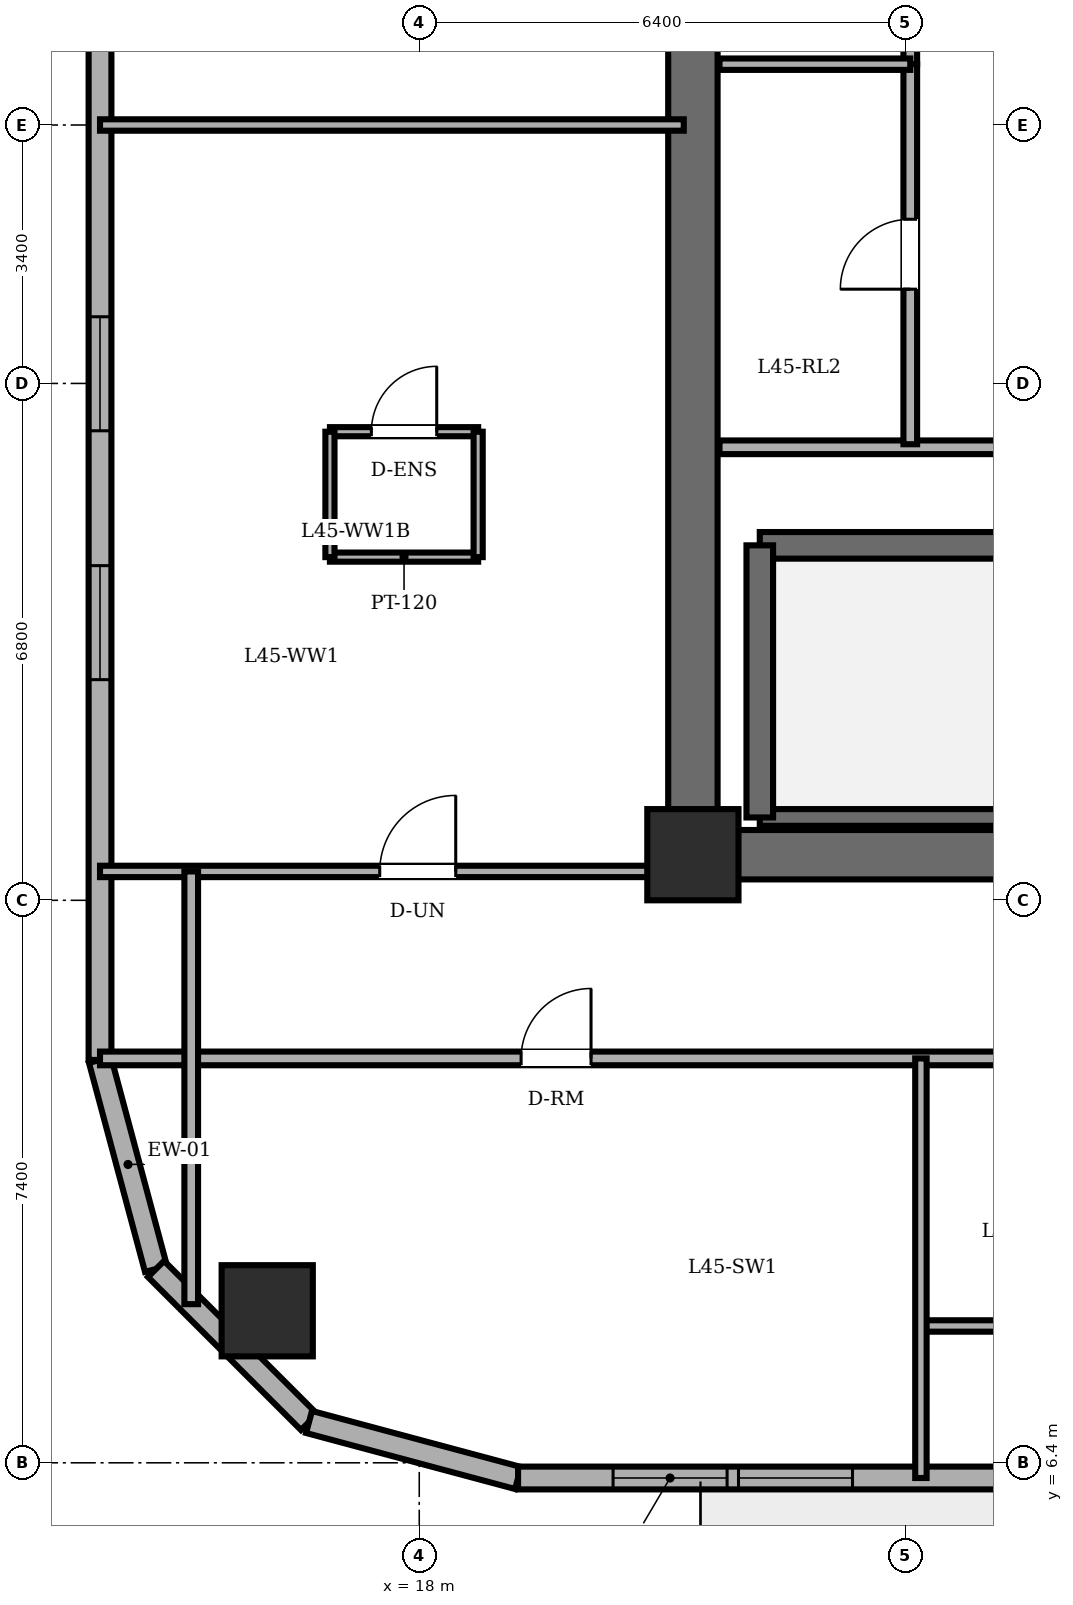
"""IFC4 building model, lengths in metres.
Left out: names, types, materials, properties, quantities, classifications, styles, units other than length and angle.
Written with IfcOpenShell. Run it as: python <this file> out.ifc"""

import sys

from ifc_helpers import new_model, si_unit, direction, frame, frame_2d, origin, origin_2d, place, context, subcontext, project, spatial, rectangle, circle, extrude, element, fill, save


model = new_model("IFC4")
c1 = context("Model", 3, precision=1e-05, world=origin(), true_north=direction((0.0, 1.0)))
c2 = subcontext(c1, "Body", "Model", "MODEL_VIEW")
j1 = project(units=[si_unit("LENGTHUNIT", "METRE"), si_unit("PLANEANGLEUNIT", "RADIAN")], contexts=[c1])
p1 = place(None, origin())
s1 = spatial("IfcSite", under=j1, at=p1, CompositionType="ELEMENT")
p2 = place(p1, origin())
s2 = spatial("IfcBuilding", under=s1, at=p2, CompositionType="ELEMENT")
p3 = place(p2, frame((0.0, 0.0, 172.6)))
s3 = spatial("IfcBuildingStorey", under=s2, at=p3, CompositionType="ELEMENT", Elevation=172.6)
p4 = place(p3, frame((21.6, 14.4, 0.0), z_axis=(0.0, 0.0, 1.0), x_axis=(1.0, 0.0, 0.0)))
e1 = element("IfcColumn", 1, at=p4, inside=s3, PredefinedType="COLUMN", context=c2, shape_type="SweptSolid", body=[
    extrude(rectangle(XDim=1.2, YDim=1.2, at=origin_2d()), origin(), (0.0, 0.0, 1.0), 3.6),
])
p5 = place(p3, frame((16.0, 8.4, 0.0), z_axis=(0.0, 0.0, 1.0), x_axis=(1.0, 0.0, 0.0)))
e2 = element("IfcColumn", 2, at=p5, inside=s3, PredefinedType="COLUMN", context=c2, shape_type="SweptSolid", body=[
    extrude(circle(Radius=0.6, at=origin_2d()), origin(), (0.0, 0.0, 1.0), 3.6),
])
p6 = place(p3, frame((13.8, 11.7, 0.0), z_axis=(0.0, 0.0, 1.0), x_axis=(0.258884674387, -0.965908238586, 0.0)))
e3 = element("IfcWall", 3, at=p6, inside=s3, PredefinedType="SOLIDWALL", context=c2, shape_type="SweptSolid", body=[
    extrude(rectangle(XDim=2.847, YDim=0.3, at=frame_2d((1.424, 0.0))), origin(), (0.0, 0.0, 1.0), 3.4),
])
p7 = place(p3, frame((14.537, 8.95, 0.0), z_axis=(0.0, 0.0, 1.0), x_axis=(0.707106781187, -0.707106781187, 0.0)))
e4 = element("IfcWall", 4, at=p7, inside=s3, PredefinedType="SOLIDWALL", context=c2, shape_type="SweptSolid", body=[
    extrude(rectangle(XDim=2.847, YDim=0.3, at=frame_2d((1.423, 0.0))), origin(), (0.0, 0.0, 1.0), 3.4),
])
p8 = place(p3, frame((16.55, 6.937, 0.0), z_axis=(0.0, 0.0, 1.0), x_axis=(0.965908238586, -0.258884674387, 0.0)))
e5 = element("IfcWall", 5, at=p8, inside=s3, PredefinedType="SOLIDWALL", context=c2, shape_type="SweptSolid", body=[
    extrude(rectangle(XDim=2.847, YDim=0.3, at=frame_2d((1.424, 0.0))), origin(), (0.0, 0.0, 1.0), 3.4),
])
p9 = place(p3, frame((19.3, 6.2, 0.0), z_axis=(0.0, 0.0, 1.0), x_axis=(1.0, 0.0, 0.0)))
e6 = element("IfcWall", 6, at=p9, inside=s3, PredefinedType="SOLIDWALL", context=c2, shape_type="SweptSolid", body=[
    extrude(rectangle(XDim=30.282, YDim=0.3, at=frame_2d((15.141, 0.0))), origin(), (0.0, 0.0, 1.0), 3.4),
])
p10 = place(p9, frame((10.075, 0.0, 0.0)))
e7 = element("IfcOpeningElement", 7, at=p10, cuts=e6, PredefinedType="OPENING", context=c2, shape_type="SweptSolid", body=[
    extrude(rectangle(XDim=0.95, YDim=2.2, at=frame_2d((0.475, 1.1))), frame((0.0, 0.16, 0.0), z_axis=(0.0, -1.0, 0.0), x_axis=(1.0, 0.0, 0.0)), (0.0, 0.0, 1.0), 0.32),
])
p11 = place(p9, frame((1.25, 0.0, 0.85)))
e8 = element("IfcOpeningElement", 8, at=p11, cuts=e6, PredefinedType="OPENING", context=c2, shape_type="SweptSolid", body=[
    extrude(rectangle(XDim=1.5, YDim=1.55, at=frame_2d((0.75, 0.775))), frame((0.0, 0.16, 0.0), z_axis=(0.0, -1.0, 0.0), x_axis=(1.0, 0.0, 0.0)), (0.0, 0.0, 1.0), 0.32),
])
p12 = place(p9, frame((2.9, 0.0, 0.85)))
e9 = element("IfcOpeningElement", 9, at=p12, cuts=e6, PredefinedType="OPENING", context=c2, shape_type="SweptSolid", body=[
    extrude(rectangle(XDim=1.5, YDim=1.55, at=frame_2d((0.75, 0.775))), frame((0.0, 0.16, 0.0), z_axis=(0.0, -1.0, 0.0), x_axis=(1.0, 0.0, 0.0)), (0.0, 0.0, 1.0), 0.32),
])
p13 = place(p9, frame((6.45, 0.0, 0.85)))
e10 = element("IfcOpeningElement", 10, at=p13, cuts=e6, PredefinedType="OPENING", context=c2, shape_type="SweptSolid", body=[
    extrude(rectangle(XDim=1.5, YDim=1.55, at=frame_2d((0.75, 0.775))), frame((0.0, 0.16, 0.0), z_axis=(0.0, -1.0, 0.0), x_axis=(1.0, 0.0, 0.0)), (0.0, 0.0, 1.0), 0.32),
])
p14 = place(p9, frame((15.294, 0.0, 0.85)))
e11 = element("IfcOpeningElement", 11, at=p14, cuts=e6, PredefinedType="OPENING", context=c2, shape_type="SweptSolid", body=[
    extrude(rectangle(XDim=1.5, YDim=1.55, at=frame_2d((0.75, 0.775))), frame((0.0, 0.16, 0.0), z_axis=(0.0, -1.0, 0.0), x_axis=(1.0, 0.0, 0.0)), (0.0, 0.0, 1.0), 0.32),
])
p15 = place(p9, frame((22.238, 0.0, 0.85)))
e12 = element("IfcOpeningElement", 12, at=p15, cuts=e6, PredefinedType="OPENING", context=c2, shape_type="SweptSolid", body=[
    extrude(rectangle(XDim=1.5, YDim=1.55, at=frame_2d((0.75, 0.775))), frame((0.0, 0.16, 0.0), z_axis=(0.0, -1.0, 0.0), x_axis=(1.0, 0.0, 0.0)), (0.0, 0.0, 1.0), 0.32),
])
p16 = place(p3, frame((13.8, 36.3, 0.0), z_axis=(0.0, 0.0, 1.0), x_axis=(0.0, -1.0, 0.0)))
e13 = element("IfcWall", 13, at=p16, inside=s3, PredefinedType="SOLIDWALL", context=c2, shape_type="SweptSolid", body=[
    extrude(rectangle(XDim=24.6, YDim=0.3, at=frame_2d((12.3, 0.0))), origin(), (0.0, 0.0, 1.0), 3.4),
])
p17 = place(p16, frame((5.003, 0.0, 0.85)))
e14 = element("IfcOpeningElement", 14, at=p17, cuts=e13, PredefinedType="OPENING", context=c2, shape_type="SweptSolid", body=[
    extrude(rectangle(XDim=1.5, YDim=1.55, at=frame_2d((0.75, 0.775))), frame((0.0, 0.16, 0.0), z_axis=(0.0, -1.0, 0.0), x_axis=(1.0, 0.0, 0.0)), (0.0, 0.0, 1.0), 0.32),
])
p18 = place(p16, frame((8.277, 0.0, 0.85)))
e15 = element("IfcOpeningElement", 15, at=p18, cuts=e13, PredefinedType="OPENING", context=c2, shape_type="SweptSolid", body=[
    extrude(rectangle(XDim=1.5, YDim=1.55, at=frame_2d((0.75, 0.775))), frame((0.0, 0.16, 0.0), z_axis=(0.0, -1.0, 0.0), x_axis=(1.0, 0.0, 0.0)), (0.0, 0.0, 1.0), 0.32),
])
p19 = place(p16, frame((14.823, 0.0, 0.85)))
e16 = element("IfcOpeningElement", 16, at=p19, cuts=e13, PredefinedType="OPENING", context=c2, shape_type="SweptSolid", body=[
    extrude(rectangle(XDim=1.5, YDim=1.55, at=frame_2d((0.75, 0.775))), frame((0.0, 0.16, 0.0), z_axis=(0.0, -1.0, 0.0), x_axis=(1.0, 0.0, 0.0)), (0.0, 0.0, 1.0), 0.32),
])
p20 = place(p16, frame((18.097, 0.0, 0.85)))
e17 = element("IfcOpeningElement", 17, at=p20, cuts=e13, PredefinedType="OPENING", context=c2, shape_type="SweptSolid", body=[
    extrude(rectangle(XDim=1.5, YDim=1.55, at=frame_2d((0.75, 0.775))), frame((0.0, 0.16, 0.0), z_axis=(0.0, -1.0, 0.0), x_axis=(1.0, 0.0, 0.0)), (0.0, 0.0, 1.0), 0.32),
])
p21 = place(p3, frame((21.6, 14.4, 0.0), z_axis=(0.0, 0.0, 1.0), x_axis=(0.0, 1.0, 0.0)))
e18 = element("IfcWall", 18, at=p21, inside=s3, PredefinedType="SHEAR", context=c2, shape_type="SweptSolid", body=[
    extrude(rectangle(XDim=19.2, YDim=0.65, at=frame_2d((9.6, 0.0))), origin(), (0.0, 0.0, 1.0), 3.4),
])
p22 = place(p3, frame((37.2, 14.4, 0.0), z_axis=(0.0, 0.0, 1.0), x_axis=(-1.0, 0.0, 0.0)))
e19 = element("IfcWall", 19, at=p22, inside=s3, PredefinedType="SHEAR", context=c2, shape_type="SweptSolid", body=[
    extrude(rectangle(XDim=15.6, YDim=0.65, at=frame_2d((7.8, 0.0))), origin(), (0.0, 0.0, 1.0), 3.4),
])
p23 = place(p3, frame((22.48, 18.47, 0.0), z_axis=(0.0, 0.0, 1.0), x_axis=(1.0, 0.0, 0.0)))
e20 = element("IfcWall", 20, at=p23, inside=s3, PredefinedType="SOLIDWALL", context=c2, shape_type="SweptSolid", body=[
    extrude(rectangle(XDim=7.79, YDim=0.35, at=frame_2d((3.895, 0.0))), origin(), (0.0, 0.0, 1.0), 3.4),
])
p24 = place(p3, frame((22.48, 14.89, 0.0), z_axis=(0.0, 0.0, 1.0), x_axis=(1.0, 0.0, 0.0)))
e21 = element("IfcWall", 21, at=p24, inside=s3, PredefinedType="PARTITIONING", context=c2, shape_type="SweptSolid", body=[
    extrude(rectangle(XDim=7.79, YDim=0.22, at=frame_2d((3.895, 0.0))), origin(), (0.0, 0.0, 1.0), 3.4),
])
p25 = place(p3, frame((22.48, 14.89, 0.0), z_axis=(0.0, 0.0, 1.0), x_axis=(0.0, 1.0, 0.0)))
e22 = element("IfcWall", 22, at=p25, inside=s3, PredefinedType="SOLIDWALL", context=c2, shape_type="SweptSolid", body=[
    extrude(rectangle(XDim=3.58, YDim=0.35, at=frame_2d((1.79, 0.0))), origin(), (0.0, 0.0, 1.0), 3.4),
])
p26 = place(p3, frame((21.95, 19.76, 0.0), z_axis=(0.0, 0.0, 1.0), x_axis=(1.0, 0.0, 0.0)))
e23 = element("IfcWall", 23, at=p26, inside=s3, PredefinedType="PARTITIONING", context=c2, shape_type="SweptSolid", body=[
    extrude(rectangle(XDim=14.87, YDim=0.18, at=frame_2d((7.435, 0.0))), origin(), (0.0, 0.0, 1.0), 3.4),
])
p27 = place(p3, frame((24.46, 24.8, 0.0), z_axis=(0.0, 0.0, 1.0), x_axis=(0.0, 1.0, 0.0)))
e24 = element("IfcWall", 24, at=p27, inside=s3, PredefinedType="PARTITIONING", context=c2, shape_type="SweptSolid", body=[
    extrude(rectangle(XDim=2.7, YDim=0.18, at=frame_2d((1.35, 0.0))), origin(), (0.0, 0.0, 1.0), 3.4),
])
p28 = place(p27, frame((0.89, 0.0, 0.0)))
e25 = element("IfcOpeningElement", 25, at=p28, cuts=e24, PredefinedType="OPENING", context=c2, shape_type="SweptSolid", body=[
    extrude(rectangle(XDim=0.92, YDim=2.1, at=frame_2d((0.46, 1.05))), frame((0.0, 0.1, 0.0), z_axis=(0.0, -1.0, 0.0), x_axis=(1.0, 0.0, 0.0)), (0.0, 0.0, 1.0), 0.2),
])
p29 = place(p3, frame((24.46, 19.8, 0.0), z_axis=(0.0, 0.0, 1.0), x_axis=(0.0, 1.0, 0.0)))
e26 = element("IfcWall", 26, at=p29, inside=s3, PredefinedType="PARTITIONING", context=c2, shape_type="SweptSolid", body=[
    extrude(rectangle(XDim=5.0, YDim=0.18, at=frame_2d((2.5, 0.0))), origin(), (0.0, 0.0, 1.0), 3.4),
])
p30 = place(p29, frame((2.04, 0.0, 0.0)))
e27 = element("IfcOpeningElement", 27, at=p30, cuts=e26, PredefinedType="OPENING", context=c2, shape_type="SweptSolid", body=[
    extrude(rectangle(XDim=0.92, YDim=2.1, at=frame_2d((0.46, 1.05))), frame((0.0, 0.1, 0.0), z_axis=(0.0, -1.0, 0.0), x_axis=(1.0, 0.0, 0.0)), (0.0, 0.0, 1.0), 0.2),
])
p31 = place(p3, frame((21.95, 24.8, 0.0), z_axis=(0.0, 0.0, 1.0), x_axis=(1.0, 0.0, 0.0)))
e28 = element("IfcWall", 28, at=p31, inside=s3, PredefinedType="PARTITIONING", context=c2, shape_type="SweptSolid", body=[
    extrude(rectangle(XDim=2.51, YDim=0.15, at=frame_2d((1.255, 0.0))), origin(), (0.0, 0.0, 1.0), 3.4),
])
p32 = place(p3, frame((16.825, 19.965, 0.0), z_axis=(0.0, 0.0, 1.0), x_axis=(1.0, 0.0, 0.0)))
e29 = element("IfcWall", 29, at=p32, inside=s3, PredefinedType="PARTITIONING", context=c2, shape_type="SweptSolid", body=[
    extrude(rectangle(XDim=1.95, YDim=0.12, at=frame_2d((0.975, 0.0))), origin(), (0.0, 0.0, 1.0), 3.4),
])
p33 = place(p32, frame((0.545, 0.0, 0.0)))
e30 = element("IfcOpeningElement", 30, at=p33, cuts=e29, PredefinedType="OPENING", context=c2, shape_type="SweptSolid", body=[
    extrude(rectangle(XDim=0.86, YDim=2.1, at=frame_2d((0.43, 1.05))), frame((0.0, 0.07, 0.0), z_axis=(0.0, -1.0, 0.0), x_axis=(1.0, 0.0, 0.0)), (0.0, 0.0, 1.0), 0.14),
])
p34 = place(p3, frame((18.775, 18.315, 0.0), z_axis=(0.0, 0.0, 1.0), x_axis=(-1.0, 0.0, 0.0)))
e31 = element("IfcWall", 31, at=p34, inside=s3, PredefinedType="PARTITIONING", context=c2, shape_type="SweptSolid", body=[
    extrude(rectangle(XDim=1.95, YDim=0.12, at=frame_2d((0.975, 0.0))), origin(), (0.0, 0.0, 1.0), 3.4),
])
for number, where, z_axis, x_axis in (
    (32, (16.825, 19.965, 0.0), (0.0, 0.0, 1.0), (0.0, -1.0, 0.0)),
    (33, (18.775, 18.315, 0.0), (0.0, 0.0, 1.0), (0.0, 1.0, 0.0)),
):
    element("IfcWall", number, at=place(p3, frame(where, z_axis=z_axis, x_axis=x_axis)), inside=s3, PredefinedType="PARTITIONING", context=c2, shape_type="SweptSolid", body=[
        extrude(rectangle(XDim=1.65, YDim=0.12, at=frame_2d((0.825, 0.0))), origin(), (0.0, 0.0, 1.0), 3.4),
    ])
p35 = place(p3, frame((24.6, 8.2, 0.0), z_axis=(0.0, 0.0, 1.0), x_axis=(1.0, 0.0, 0.0)))
e34 = element("IfcWall", 34, at=p35, inside=s3, PredefinedType="PARTITIONING", context=c2, shape_type="SweptSolid", body=[
    extrude(rectangle(XDim=3.8, YDim=0.15, at=frame_2d((1.9, 0.0))), origin(), (0.0, 0.0, 1.0), 2.882),
])
p36 = place(p3, frame((13.8, 11.72, 0.0), z_axis=(0.0, 0.0, 1.0), x_axis=(1.0, 0.0, 0.0)))
e35 = element("IfcWall", 35, at=p36, inside=s3, PredefinedType="PARTITIONING", context=c2, shape_type="SweptSolid", body=[
    extrude(rectangle(XDim=40.6, YDim=0.18, at=frame_2d((20.3, 0.0))), origin(), (0.0, 0.0, 1.0), 3.4),
])
p37 = place(p36, frame((12.24, 0.0, 0.0)))
e36 = element("IfcOpeningElement", 36, at=p37, cuts=e35, PredefinedType="OPENING", context=c2, shape_type="SweptSolid", body=[
    extrude(rectangle(XDim=0.92, YDim=2.1, at=frame_2d((0.46, 1.05))), frame((0.0, 0.1, 0.0), z_axis=(0.0, -1.0, 0.0), x_axis=(1.0, 0.0, 0.0)), (0.0, 0.0, 1.0), 0.2),
])
p38 = place(p36, frame((5.54, 0.0, 0.0)))
e37 = element("IfcOpeningElement", 37, at=p38, cuts=e35, PredefinedType="OPENING", context=c2, shape_type="SweptSolid", body=[
    extrude(rectangle(XDim=0.92, YDim=2.1, at=frame_2d((0.46, 1.05))), frame((0.0, 0.1, 0.0), z_axis=(0.0, -1.0, 0.0), x_axis=(1.0, 0.0, 0.0)), (0.0, 0.0, 1.0), 0.2),
])
p39 = place(p36, frame((26.88, 0.0, 0.0)))
e38 = element("IfcOpeningElement", 38, at=p39, cuts=e35, PredefinedType="OPENING", context=c2, shape_type="SweptSolid", body=[
    extrude(rectangle(XDim=0.92, YDim=2.1, at=frame_2d((0.46, 1.05))), frame((0.0, 0.1, 0.0), z_axis=(0.0, -1.0, 0.0), x_axis=(1.0, 0.0, 0.0)), (0.0, 0.0, 1.0), 0.2),
])
p40 = place(p3, frame((13.8, 14.18, 0.0), z_axis=(0.0, 0.0, 1.0), x_axis=(1.0, 0.0, 0.0)))
e39 = element("IfcWall", 39, at=p40, inside=s3, PredefinedType="PARTITIONING", context=c2, shape_type="SweptSolid", body=[
    extrude(rectangle(XDim=7.68, YDim=0.15, at=frame_2d((3.84, 0.0))), origin(), (0.0, 0.0, 1.0), 3.4),
])
p41 = place(p40, frame((3.68, 0.0, 0.0)))
e40 = element("IfcOpeningElement", 40, at=p41, cuts=e39, PredefinedType="OPENING", context=c2, shape_type="SweptSolid", body=[
    extrude(rectangle(XDim=1.0, YDim=2.15, at=frame_2d((0.5, 1.075))), frame((0.0, 0.085, 0.0), z_axis=(0.0, -1.0, 0.0), x_axis=(1.0, 0.0, 0.0)), (0.0, 0.0, 1.0), 0.17),
])
p42 = place(p3, frame((13.8, 24.0, 0.0), z_axis=(0.0, 0.0, 1.0), x_axis=(1.0, 0.0, 0.0)))
e41 = element("IfcWall", 41, at=p42, inside=s3, PredefinedType="PARTITIONING", context=c2, shape_type="SweptSolid", body=[
    extrude(rectangle(XDim=7.68, YDim=0.15, at=frame_2d((3.84, 0.0))), origin(), (0.0, 0.0, 1.0), 3.4),
])
p43 = place(p3, frame((15.0, 8.487, 0.0), z_axis=(0.0, 0.0, 1.0), x_axis=(0.0, 1.0, 0.0)))
e42 = element("IfcWall", 42, at=p43, inside=s3, PredefinedType="PARTITIONING", context=c2, shape_type="SweptSolid", body=[
    extrude(rectangle(XDim=5.693, YDim=0.18, at=frame_2d((2.846, 0.0))), origin(), (0.0, 0.0, 1.0), 3.4),
])
p44 = place(p3, frame((24.6, 6.2, 0.0), z_axis=(0.0, 0.0, 1.0), x_axis=(0.0, 1.0, 0.0)))
e43 = element("IfcWall", 43, at=p44, inside=s3, PredefinedType="PARTITIONING", context=c2, shape_type="SweptSolid", body=[
    extrude(rectangle(XDim=5.52, YDim=0.15, at=frame_2d((2.76, 0.0))), origin(), (0.0, 0.0, 1.0), 3.4),
])
p45 = place(p11, origin())
e44 = element("IfcWindow", 44, at=p45, inside=s3, PartitioningType="DOUBLE_PANEL_VERTICAL", PredefinedType="WINDOW", context=c2, shape_type="SweptSolid", body=[
    extrude(rectangle(XDim=1.5, YDim=1.55, at=frame_2d((0.75, 0.775))), frame((0.0, 0.03, 0.0), z_axis=(0.0, -1.0, 0.0), x_axis=(1.0, 0.0, 0.0)), (0.0, 0.0, 1.0), 0.06),
])
fill(e8, e44)
p46 = place(p12, origin())
e45 = element("IfcWindow", 45, at=p46, inside=s3, PartitioningType="DOUBLE_PANEL_VERTICAL", PredefinedType="WINDOW", context=c2, shape_type="SweptSolid", body=[
    extrude(rectangle(XDim=1.5, YDim=1.55, at=frame_2d((0.75, 0.775))), frame((0.0, 0.03, 0.0), z_axis=(0.0, -1.0, 0.0), x_axis=(1.0, 0.0, 0.0)), (0.0, 0.0, 1.0), 0.06),
])
fill(e9, e45)
p47 = place(p19, origin())
e46 = element("IfcWindow", 46, at=p47, inside=s3, PartitioningType="DOUBLE_PANEL_VERTICAL", PredefinedType="WINDOW", context=c2, shape_type="SweptSolid", body=[
    extrude(rectangle(XDim=1.5, YDim=1.55, at=frame_2d((0.75, 0.775))), frame((0.0, 0.03, 0.0), z_axis=(0.0, -1.0, 0.0), x_axis=(1.0, 0.0, 0.0)), (0.0, 0.0, 1.0), 0.06),
])
fill(e16, e46)
p48 = place(p20, origin())
e47 = element("IfcWindow", 47, at=p48, inside=s3, PartitioningType="DOUBLE_PANEL_VERTICAL", PredefinedType="WINDOW", context=c2, shape_type="SweptSolid", body=[
    extrude(rectangle(XDim=1.5, YDim=1.55, at=frame_2d((0.75, 0.775))), frame((0.0, 0.03, 0.0), z_axis=(0.0, -1.0, 0.0), x_axis=(1.0, 0.0, 0.0)), (0.0, 0.0, 1.0), 0.06),
])
fill(e17, e47)
p49 = place(p30, origin())
e48 = element("IfcDoor", 48, at=p49, inside=s3, OperationType="SINGLE_SWING_LEFT", PredefinedType="DOOR", context=c2, shape_type="SweptSolid", body=[
    extrude(rectangle(XDim=0.92, YDim=2.1, at=frame_2d((0.46, 1.05))), frame((0.0, 0.025, 0.0), z_axis=(0.0, -1.0, 0.0), x_axis=(1.0, 0.0, 0.0)), (0.0, 0.0, 1.0), 0.05),
])
fill(e27, e48)
p50 = place(p33, origin())
e49 = element("IfcDoor", 49, at=p50, inside=s3, OperationType="SINGLE_SWING_RIGHT", PredefinedType="DOOR", context=c2, shape_type="SweptSolid", body=[
    extrude(rectangle(XDim=0.86, YDim=2.1, at=frame_2d((0.43, 1.05))), frame((0.0, 0.025, 0.0), z_axis=(0.0, -1.0, 0.0), x_axis=(1.0, 0.0, 0.0)), (0.0, 0.0, 1.0), 0.05),
])
fill(e30, e49)
p51 = place(p38, origin())
e50 = element("IfcDoor", 50, at=p51, inside=s3, OperationType="SINGLE_SWING_RIGHT", PredefinedType="DOOR", context=c2, shape_type="SweptSolid", body=[
    extrude(rectangle(XDim=0.92, YDim=2.1, at=frame_2d((0.46, 1.05))), frame((0.0, 0.025, 0.0), z_axis=(0.0, -1.0, 0.0), x_axis=(1.0, 0.0, 0.0)), (0.0, 0.0, 1.0), 0.05),
])
fill(e37, e50)
p52 = place(p41, origin())
e51 = element("IfcDoor", 51, at=p52, inside=s3, OperationType="SINGLE_SWING_RIGHT", PredefinedType="DOOR", context=c2, shape_type="SweptSolid", body=[
    extrude(rectangle(XDim=1.0, YDim=2.15, at=frame_2d((0.5, 1.075))), frame((0.0, 0.025, 0.0), z_axis=(0.0, -1.0, 0.0), x_axis=(1.0, 0.0, 0.0)), (0.0, 0.0, 1.0), 0.05),
])
fill(e40, e51)
save(model, sys.argv[1])
